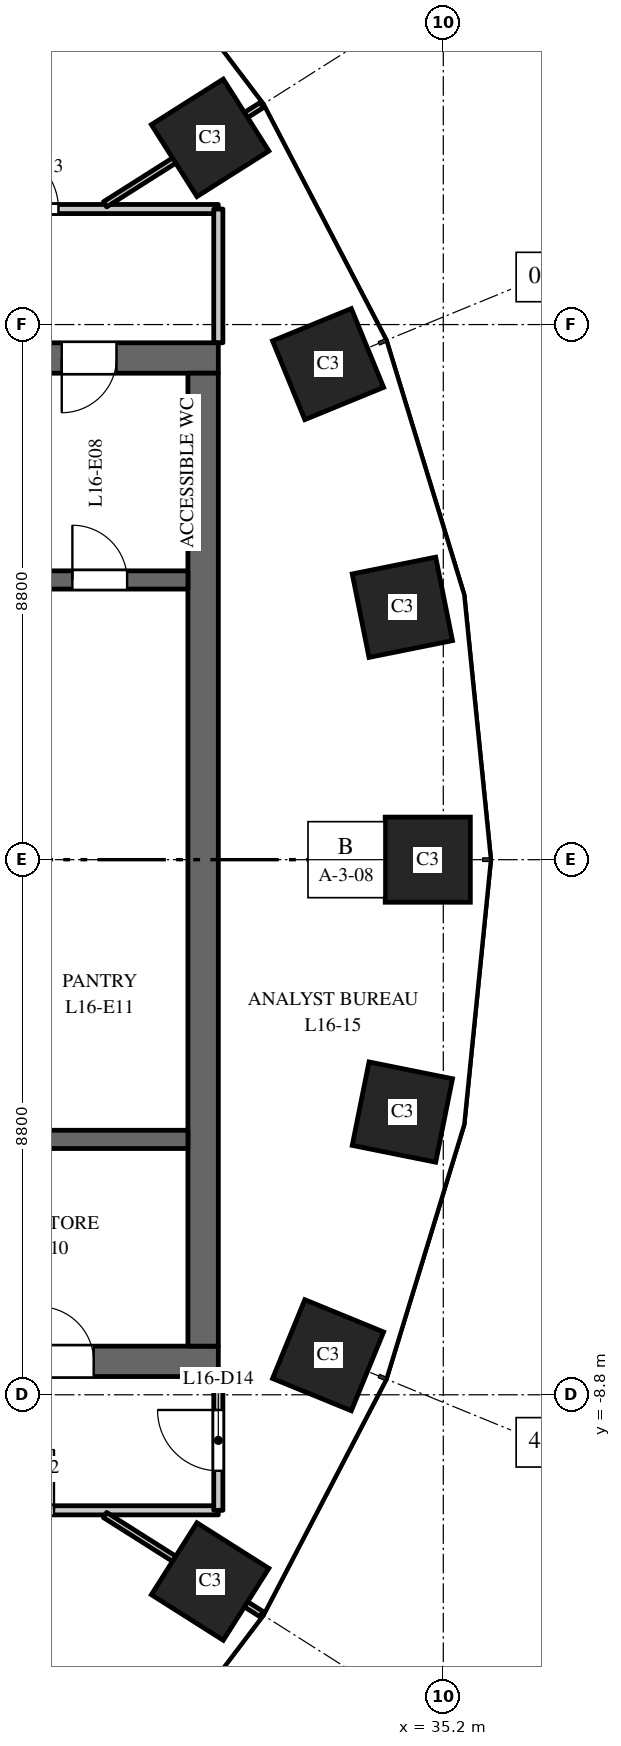
"""IFC4 building model, lengths in metres.
Left out: names, types, materials, properties, quantities, classifications, styles, units other than length and angle.
Written with IfcOpenShell. Run it as: python <this file> out.ifc"""

import sys

from ifc_helpers import new_model, si_unit, direction, frame, frame_2d, origin, origin_2d, place, context, subcontext, project, spatial, rectangle, extrude, element, fill, save


model = new_model("IFC4")
c1 = context("Model", 3, precision=1e-05, world=origin(), true_north=direction((0.0, 1.0)))
c2 = subcontext(c1, "Body", "Model", "MODEL_VIEW")
j1 = project(units=[si_unit("LENGTHUNIT", "METRE"), si_unit("PLANEANGLEUNIT", "RADIAN")], contexts=[c1])
p1 = place(None, origin())
s1 = spatial("IfcSite", under=j1, at=p1, CompositionType="ELEMENT")
p2 = place(p1, origin())
s2 = spatial("IfcBuilding", under=s1, at=p2, CompositionType="ELEMENT")
p3 = place(p2, frame((0.0, 0.0, 74.5)))
s3 = spatial("IfcBuildingStorey", under=s2, at=p3, CompositionType="ELEMENT", Elevation=74.5)
for number, where, z_axis, x_axis in (
    (1, (34.945, 0.0, 0.0), (0.0, 0.0, 1.0), (0.0, 1.0, 0.0)),
    (2, (34.527, 4.151, 0.0), (0.0, 0.0, 1.0), (-0.197, 0.98, 0.0)),
    (3, (33.305, 8.149, 0.0), (0.0, 0.0, 1.0), (-0.379, 0.925, 0.0)),
    (4, (31.365, 11.871, 0.0), (0.0, 0.0, 1.0), (-0.535, 0.845, 0.0)),
    (5, (31.365, -11.871, 0.0), (0.0, 0.0, 1.0), (0.535, 0.845, 0.0)),
    (6, (33.305, -8.149, 0.0), (0.0, 0.0, 1.0), (0.379, 0.925, 0.0)),
    (7, (34.527, -4.151, 0.0), (0.0, 0.0, 1.0), (0.197, 0.98, 0.0)),
):
    element("IfcColumn", number, at=place(p3, frame(where, z_axis=z_axis, x_axis=x_axis)), inside=s3, PredefinedType="COLUMN", context=c2, shape_type="SweptSolid", body=[
        extrude(rectangle(XDim=1.4, YDim=1.4, at=origin_2d()), origin(), (0.0, 0.0, 1.0), 4.0),
    ])
p4 = place(p3, frame((16.5, 8.25, 0.0), z_axis=(0.0, 0.0, 1.0), x_axis=(1.0, 0.0, 0.0)))
e8 = element("IfcWall", 8, at=p4, inside=s3, PredefinedType="SHEAR", context=c2, shape_type="SweptSolid", body=[
    extrude(rectangle(XDim=15.0, YDim=0.5, at=frame_2d((7.5, 0.0))), origin(), (0.0, 0.0, 1.0), 3.7),
])
p5 = place(p4, frame((6.9, 0.0, 0.0)))
e9 = element("IfcOpeningElement", 9, at=p5, cuts=e8, PredefinedType="OPENING", context=c2, shape_type="SweptSolid", body=[
    extrude(rectangle(XDim=1.2, YDim=2.1, at=frame_2d((0.6, 1.05))), frame((0.0, 0.26, 0.0), z_axis=(0.0, -1.0, 0.0), x_axis=(1.0, 0.0, 0.0)), (0.0, 0.0, 1.0), 0.52),
])
p6 = place(p4, frame((12.425, 0.0, 0.0)))
e10 = element("IfcOpeningElement", 10, at=p6, cuts=e8, PredefinedType="OPENING", context=c2, shape_type="SweptSolid", body=[
    extrude(rectangle(XDim=0.9, YDim=2.1, at=frame_2d((0.45, 1.05))), frame((0.0, 0.26, 0.0), z_axis=(0.0, -1.0, 0.0), x_axis=(1.0, 0.0, 0.0)), (0.0, 0.0, 1.0), 0.52),
])
p7 = place(p3, frame((16.5, -8.25, 0.0), z_axis=(0.0, 0.0, 1.0), x_axis=(1.0, 0.0, 0.0)))
e11 = element("IfcWall", 11, at=p7, inside=s3, PredefinedType="SHEAR", context=c2, shape_type="SweptSolid", body=[
    extrude(rectangle(XDim=15.0, YDim=0.5, at=frame_2d((7.5, 0.0))), origin(), (0.0, 0.0, 1.0), 3.7),
])
p8 = place(p7, frame((6.9, 0.0, 0.0)))
e12 = element("IfcOpeningElement", 12, at=p8, cuts=e11, PredefinedType="OPENING", context=c2, shape_type="SweptSolid", body=[
    extrude(rectangle(XDim=1.2, YDim=2.1, at=frame_2d((0.6, 1.05))), frame((0.0, 0.26, 0.0), z_axis=(0.0, -1.0, 0.0), x_axis=(1.0, 0.0, 0.0)), (0.0, 0.0, 1.0), 0.52),
])
p9 = place(p7, frame((12.05, 0.0, 0.0)))
e13 = element("IfcOpeningElement", 13, at=p9, cuts=e11, PredefinedType="OPENING", context=c2, shape_type="SweptSolid", body=[
    extrude(rectangle(XDim=0.9, YDim=2.1, at=frame_2d((0.45, 1.05))), frame((0.0, 0.26, 0.0), z_axis=(0.0, -1.0, 0.0), x_axis=(1.0, 0.0, 0.0)), (0.0, 0.0, 1.0), 0.52),
])
p10 = place(p3, frame((31.25, -8.0, 0.0), z_axis=(0.0, 0.0, 1.0), x_axis=(0.0, 1.0, 0.0)))
e14 = element("IfcWall", 14, at=p10, inside=s3, PredefinedType="SHEAR", context=c2, shape_type="SweptSolid", body=[
    extrude(rectangle(XDim=16.0, YDim=0.5, at=frame_2d((8.0, 0.0))), origin(), (0.0, 0.0, 1.0), 3.7),
])
p11 = place(p3, frame((24.9, 4.6, 0.0), z_axis=(0.0, 0.0, 1.0), x_axis=(1.0, 0.0, 0.0)))
e15 = element("IfcWall", 15, at=p11, inside=s3, PredefinedType="SHEAR", context=c2, shape_type="SweptSolid", body=[
    extrude(rectangle(XDim=6.1, YDim=0.3, at=frame_2d((3.05, 0.0))), origin(), (0.0, 0.0, 1.0), 3.7),
])
p12 = place(p11, frame((4.2, 0.0, 0.0)))
e16 = element("IfcOpeningElement", 16, at=p12, cuts=e15, PredefinedType="OPENING", context=c2, shape_type="SweptSolid", body=[
    extrude(rectangle(XDim=0.9, YDim=2.1, at=frame_2d((0.45, 1.05))), frame((0.0, 0.16, 0.0), z_axis=(0.0, -1.0, 0.0), x_axis=(1.0, 0.0, 0.0)), (0.0, 0.0, 1.0), 0.32),
])
p13 = place(p3, frame((24.9, -4.6, 0.0), z_axis=(0.0, 0.0, 1.0), x_axis=(1.0, 0.0, 0.0)))
e17 = element("IfcWall", 17, at=p13, inside=s3, PredefinedType="SHEAR", context=c2, shape_type="SweptSolid", body=[
    extrude(rectangle(XDim=6.1, YDim=0.3, at=frame_2d((3.05, 0.0))), origin(), (0.0, 0.0, 1.0), 3.7),
])
p14 = place(p3, frame((22.755, -10.7, 0.0), z_axis=(0.0, 0.0, 1.0), x_axis=(1.0, 0.0, 0.0)))
e18 = element("IfcWall", 18, at=p14, inside=s3, PredefinedType="PARTITIONING", context=c2, shape_type="SweptSolid", body=[
    extrude(rectangle(XDim=8.745, YDim=0.15, at=frame_2d((4.373, 0.0))), origin(), (0.0, 0.0, 1.0), 2.85),
])
p15 = place(p14, frame((5.042, 0.0, 0.0)))
e19 = element("IfcOpeningElement", 19, at=p15, cuts=e18, PredefinedType="OPENING", context=c2, shape_type="SweptSolid", body=[
    extrude(rectangle(XDim=1.0, YDim=2.1, at=frame_2d((0.5, 1.05))), frame((0.0, 0.085, 0.0), z_axis=(0.0, -1.0, 0.0), x_axis=(1.0, 0.0, 0.0)), (0.0, 0.0, 1.0), 0.17),
])
p16 = place(p3, frame((22.755, 10.7, 0.0), z_axis=(0.0, 0.0, 1.0), x_axis=(1.0, 0.0, 0.0)))
e20 = element("IfcWall", 20, at=p16, inside=s3, PredefinedType="PARTITIONING", context=c2, shape_type="SweptSolid", body=[
    extrude(rectangle(XDim=8.745, YDim=0.15, at=frame_2d((4.373, 0.0))), origin(), (0.0, 0.0, 1.0), 2.85),
])
p17 = place(p16, frame((5.116, 0.0, 0.0)))
e21 = element("IfcOpeningElement", 21, at=p17, cuts=e20, PredefinedType="OPENING", context=c2, shape_type="SweptSolid", body=[
    extrude(rectangle(XDim=1.0, YDim=2.1, at=frame_2d((0.5, 1.05))), frame((0.0, 0.085, 0.0), z_axis=(0.0, -1.0, 0.0), x_axis=(1.0, 0.0, 0.0)), (0.0, 0.0, 1.0), 0.17),
])
for number, where, z_axis, x_axis in (
    (22, (29.637, -10.777, 0.0), (0.0, 0.0, 1.0), (0.845, -0.535, 0.0)),
    (23, (29.637, 10.777, 0.0), (0.0, 0.0, 1.0), (0.845, 0.535, 0.0)),
):
    element("IfcWall", number, at=place(p3, frame(where, z_axis=z_axis, x_axis=x_axis)), inside=s3, PredefinedType="PARTITIONING", context=c2, shape_type="SweptSolid", body=[
        extrude(rectangle(XDim=3.048, YDim=0.1, at=frame_2d((1.524, 0.0))), origin(), (0.0, 0.0, 1.0), 2.85),
    ])
p18 = place(p3, frame((31.5, -10.7, 0.0), z_axis=(0.0, 0.0, 1.0), x_axis=(0.0, 1.0, 0.0)))
e24 = element("IfcWall", 24, at=p18, inside=s3, PredefinedType="PARTITIONING", context=c2, shape_type="SweptSolid", body=[
    extrude(rectangle(XDim=2.2, YDim=0.15, at=frame_2d((1.1, 0.0))), origin(), (0.0, 0.0, 1.0), 2.85),
])
p19 = place(p18, frame((0.65, 0.0, 0.0)))
e25 = element("IfcOpeningElement", 25, at=p19, cuts=e24, PredefinedType="OPENING", context=c2, shape_type="SweptSolid", body=[
    extrude(rectangle(XDim=1.0, YDim=2.1, at=frame_2d((0.5, 1.05))), frame((0.0, 0.085, 0.0), z_axis=(0.0, -1.0, 0.0), x_axis=(1.0, 0.0, 0.0)), (0.0, 0.0, 1.0), 0.17),
])
p20 = place(p3, frame((31.5, 8.5, 0.0), z_axis=(0.0, 0.0, 1.0), x_axis=(0.0, 1.0, 0.0)))
e26 = element("IfcWall", 26, at=p20, inside=s3, PredefinedType="PARTITIONING", context=c2, shape_type="SweptSolid", body=[
    extrude(rectangle(XDim=2.2, YDim=0.15, at=frame_2d((1.1, 0.0))), origin(), (0.0, 0.0, 1.0), 2.85),
])
p21 = place(p6, origin())
e27 = element("IfcDoor", 27, at=p21, inside=s3, OperationType="SINGLE_SWING_LEFT", PredefinedType="DOOR", context=c2, shape_type="SweptSolid", body=[
    extrude(rectangle(XDim=0.9, YDim=2.1, at=frame_2d((0.45, 1.05))), frame((0.0, 0.025, 0.0), z_axis=(0.0, -1.0, 0.0), x_axis=(1.0, 0.0, 0.0)), (0.0, 0.0, 1.0), 0.05),
])
fill(e10, e27)
p22 = place(p9, origin())
e28 = element("IfcDoor", 28, at=p22, inside=s3, OperationType="SINGLE_SWING_RIGHT", PredefinedType="DOOR", context=c2, shape_type="SweptSolid", body=[
    extrude(rectangle(XDim=0.9, YDim=2.1, at=frame_2d((0.45, 1.05))), frame((0.0, 0.025, 0.0), z_axis=(0.0, -1.0, 0.0), x_axis=(1.0, 0.0, 0.0)), (0.0, 0.0, 1.0), 0.05),
])
fill(e13, e28)
p23 = place(p12, origin())
e29 = element("IfcDoor", 29, at=p23, inside=s3, OperationType="SINGLE_SWING_RIGHT", PredefinedType="DOOR", context=c2, shape_type="SweptSolid", body=[
    extrude(rectangle(XDim=0.9, YDim=2.1, at=frame_2d((0.45, 1.05))), frame((0.0, 0.025, 0.0), z_axis=(0.0, -1.0, 0.0), x_axis=(1.0, 0.0, 0.0)), (0.0, 0.0, 1.0), 0.05),
])
fill(e16, e29)
p24 = place(p15, origin())
e30 = element("IfcDoor", 30, at=p24, inside=s3, OperationType="SINGLE_SWING_RIGHT", PredefinedType="DOOR", context=c2, shape_type="SweptSolid", body=[
    extrude(rectangle(XDim=1.0, YDim=2.1, at=frame_2d((0.5, 1.05))), frame((0.0, 0.025, 0.0), z_axis=(0.0, -1.0, 0.0), x_axis=(1.0, 0.0, 0.0)), (0.0, 0.0, 1.0), 0.05),
])
fill(e19, e30)
p25 = place(p17, origin())
e31 = element("IfcDoor", 31, at=p25, inside=s3, OperationType="SINGLE_SWING_LEFT", PredefinedType="DOOR", context=c2, shape_type="SweptSolid", body=[
    extrude(rectangle(XDim=1.0, YDim=2.1, at=frame_2d((0.5, 1.05))), frame((0.0, 0.025, 0.0), z_axis=(0.0, -1.0, 0.0), x_axis=(1.0, 0.0, 0.0)), (0.0, 0.0, 1.0), 0.05),
])
fill(e21, e31)
p26 = place(p19, origin())
e32 = element("IfcDoor", 32, at=p26, inside=s3, OperationType="SINGLE_SWING_RIGHT", PredefinedType="DOOR", context=c2, shape_type="SweptSolid", body=[
    extrude(rectangle(XDim=1.0, YDim=2.1, at=frame_2d((0.5, 1.05))), frame((0.0, 0.025, 0.0), z_axis=(0.0, -1.0, 0.0), x_axis=(1.0, 0.0, 0.0)), (0.0, 0.0, 1.0), 0.05),
])
fill(e25, e32)
save(model, sys.argv[1])
